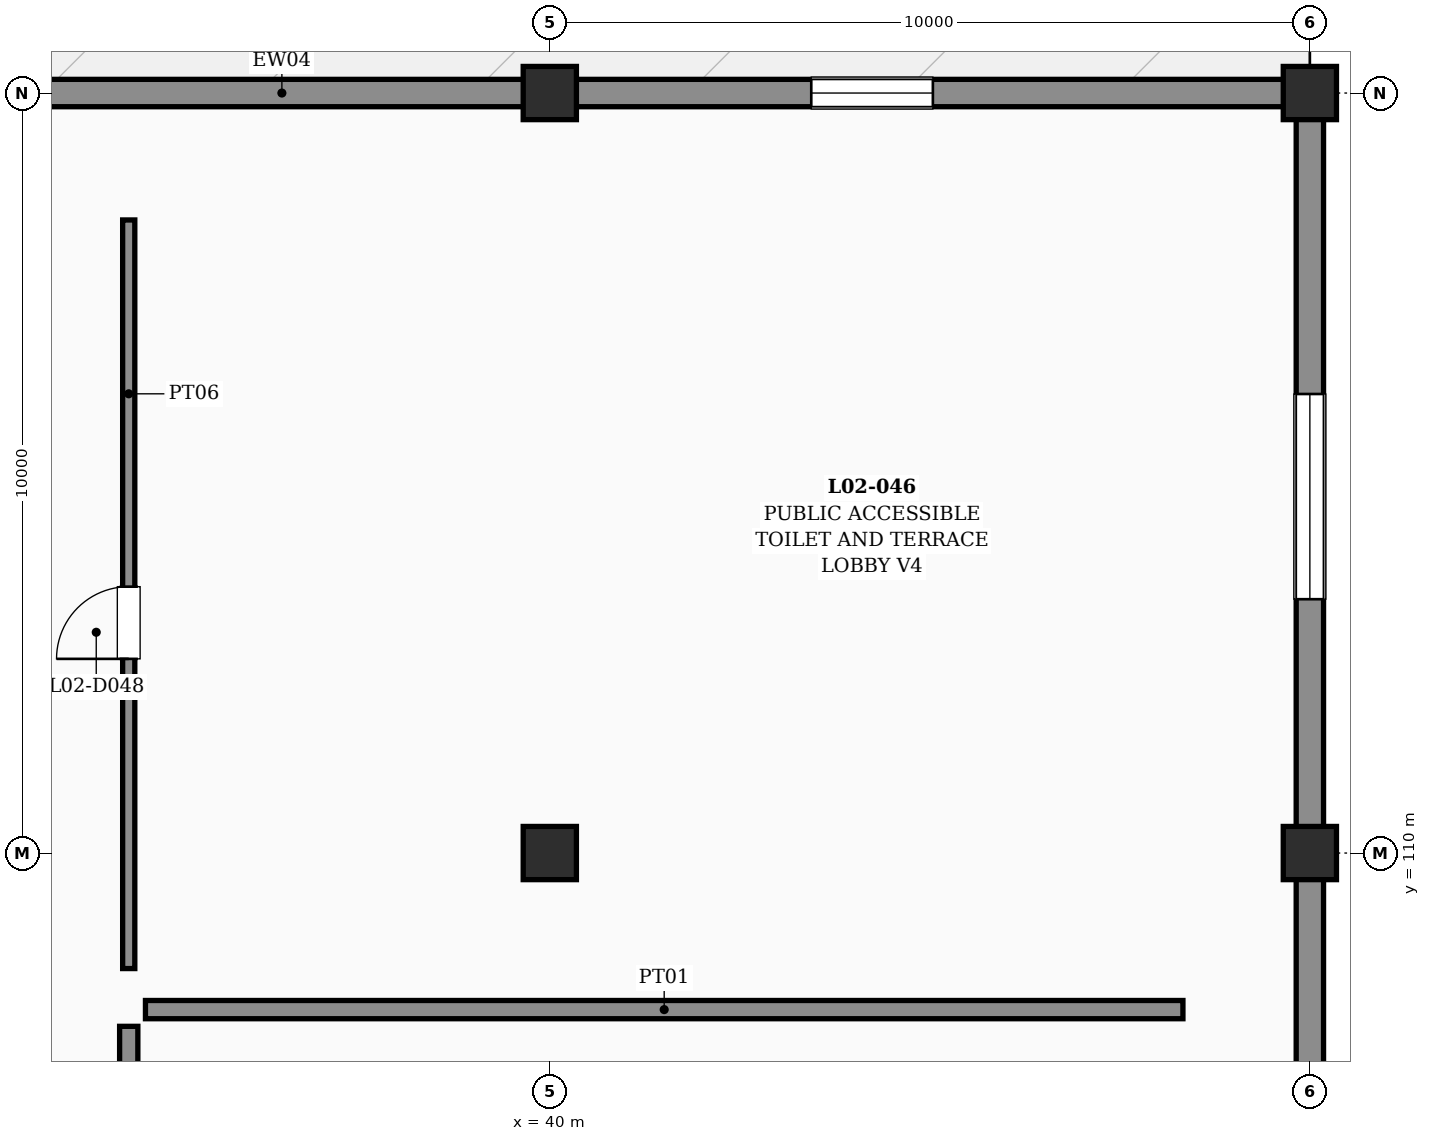
"""IFC4 building model, lengths in metres.
Left out: names, types, materials, properties, quantities, classifications, styles, units other than length and angle.
Written with IfcOpenShell. Run it as: python <this file> out.ifc"""

import sys

from ifc_helpers import new_model, si_unit, direction, frame, frame_2d, origin, origin_2d, place, context, subcontext, project, spatial, rectangle, extrude, element, fill, save


model = new_model("IFC4")
c1 = context("Model", 3, precision=1e-05, world=origin(), true_north=direction((0.0, 1.0)))
c2 = subcontext(c1, "Body", "Model", "MODEL_VIEW")
j1 = project(units=[si_unit("LENGTHUNIT", "METRE"), si_unit("PLANEANGLEUNIT", "RADIAN")], contexts=[c1])
p1 = place(None, origin())
s1 = spatial("IfcSite", under=j1, at=p1, CompositionType="ELEMENT")
p2 = place(p1, origin())
s2 = spatial("IfcBuilding", under=s1, at=p2, CompositionType="ELEMENT")
p3 = place(p2, frame((0.0, 0.0, 10.8)))
s3 = spatial("IfcBuildingStorey", under=s2, at=p3, CompositionType="ELEMENT", Elevation=10.8)
for number, where, z_axis, x_axis in (
    (1, (40.0, 110.0, 0.0), (0.0, 0.0, 1.0), (1.0, 0.0, 0.0)),
    (2, (40.0, 120.0, 0.0), (0.0, 0.0, 1.0), (1.0, 0.0, 0.0)),
    (3, (50.0, 110.0, 0.0), (0.0, 0.0, 1.0), (1.0, 0.0, 0.0)),
    (4, (50.0, 120.0, 0.0), (0.0, 0.0, 1.0), (1.0, 0.0, 0.0)),
):
    element("IfcColumn", number, at=place(p3, frame(where, z_axis=z_axis, x_axis=x_axis)), inside=s3, PredefinedType="COLUMN", context=c2, shape_type="SweptSolid", body=[
        extrude(rectangle(XDim=0.7, YDim=0.7, at=origin_2d()), origin(), (0.0, 0.0, 1.0), 4.2),
    ])
p4 = place(p3, frame((50.0, 100.24, 0.0), z_axis=(0.0, 0.0, 1.0), x_axis=(0.0, 1.0, 0.0)))
e5 = element("IfcWall", 5, at=p4, inside=s3, PredefinedType="SOLIDWALL", context=c2, shape_type="SweptSolid", body=[
    extrude(rectangle(XDim=9.52, YDim=0.36, at=frame_2d((4.76, 0.0))), origin(), (0.0, 0.0, 1.0), 3.08),
])
p5 = place(p4, frame((3.1, 0.0, 1.3)))
e6 = element("IfcOpeningElement", 6, at=p5, cuts=e5, PredefinedType="OPENING", context=c2, shape_type="SweptSolid", body=[
    extrude(rectangle(XDim=2.7, YDim=1.4, at=frame_2d((1.35, 0.7))), frame((0.0, 0.19, 0.0), z_axis=(0.0, -1.0, 0.0), x_axis=(1.0, 0.0, 0.0)), (0.0, 0.0, 1.0), 0.38),
])
p6 = place(p3, frame((50.0, 110.24, 0.0), z_axis=(0.0, 0.0, 1.0), x_axis=(0.0, 1.0, 0.0)))
e7 = element("IfcWall", 7, at=p6, inside=s3, PredefinedType="SOLIDWALL", context=c2, shape_type="SweptSolid", body=[
    extrude(rectangle(XDim=9.52, YDim=0.36, at=frame_2d((4.76, 0.0))), origin(), (0.0, 0.0, 1.0), 3.08),
])
p7 = place(p6, frame((3.1, 0.0, 1.3)))
e8 = element("IfcOpeningElement", 8, at=p7, cuts=e7, PredefinedType="OPENING", context=c2, shape_type="SweptSolid", body=[
    extrude(rectangle(XDim=2.7, YDim=1.4, at=frame_2d((1.35, 0.7))), frame((0.0, 0.19, 0.0), z_axis=(0.0, -1.0, 0.0), x_axis=(1.0, 0.0, 0.0)), (0.0, 0.0, 1.0), 0.38),
])
p8 = place(p3, frame((30.24, 120.0, 0.0), z_axis=(0.0, 0.0, 1.0), x_axis=(1.0, 0.0, 0.0)))
e9 = element("IfcWall", 9, at=p8, inside=s3, PredefinedType="SOLIDWALL", context=c2, shape_type="SweptSolid", body=[
    extrude(rectangle(XDim=9.52, YDim=0.36, at=frame_2d((4.76, 0.0))), origin(), (0.0, 0.0, 1.0), 3.23),
])
p9 = place(p8, frame((1.1, 0.0, 0.0)))
e10 = element("IfcOpeningElement", 10, at=p9, cuts=e9, PredefinedType="OPENING", context=c2, shape_type="SweptSolid", body=[
    extrude(rectangle(XDim=1.6, YDim=2.3, at=frame_2d((0.8, 1.15))), frame((0.0, 0.19, 0.0), z_axis=(0.0, -1.0, 0.0), x_axis=(1.0, 0.0, 0.0)), (0.0, 0.0, 1.0), 0.38),
])
p10 = place(p3, frame((40.24, 120.0, 0.0), z_axis=(0.0, 0.0, 1.0), x_axis=(1.0, 0.0, 0.0)))
e11 = element("IfcWall", 11, at=p10, inside=s3, PredefinedType="SOLIDWALL", context=c2, shape_type="SweptSolid", body=[
    extrude(rectangle(XDim=9.52, YDim=0.36, at=frame_2d((4.76, 0.0))), origin(), (0.0, 0.0, 1.0), 3.23),
])
p11 = place(p10, frame((3.2, 0.0, 1.1)))
e12 = element("IfcOpeningElement", 12, at=p11, cuts=e11, PredefinedType="OPENING", context=c2, shape_type="SweptSolid", body=[
    extrude(rectangle(XDim=1.6, YDim=1.5, at=frame_2d((0.8, 0.75))), frame((0.0, 0.19, 0.0), z_axis=(0.0, -1.0, 0.0), x_axis=(1.0, 0.0, 0.0)), (0.0, 0.0, 1.0), 0.38),
])
p12 = place(p3, frame((34.46, 79.846, 0.0), z_axis=(0.0, 0.0, 1.0), x_axis=(0.0, 1.0, 0.0)))
e13 = element("IfcWall", 13, at=p12, inside=s3, PredefinedType="PARTITIONING", context=c2, shape_type="SweptSolid", body=[
    extrude(rectangle(XDim=27.874, YDim=0.24, at=frame_2d((13.937, 0.0))), origin(), (0.0, 0.0, 1.0), 3.23),
])
p13 = place(p12, frame((13.087, 0.0, 0.0)))
e14 = element("IfcOpeningElement", 14, at=p13, cuts=e13, PredefinedType="OPENING", context=c2, shape_type="SweptSolid", body=[
    extrude(rectangle(XDim=1.4, YDim=2.25, at=frame_2d((0.7, 1.125))), frame((0.0, 0.13, 0.0), z_axis=(0.0, -1.0, 0.0), x_axis=(1.0, 0.0, 0.0)), (0.0, 0.0, 1.0), 0.26),
])
p14 = place(p3, frame((34.68, 107.94, 0.0), z_axis=(0.0, 0.0, 1.0), x_axis=(1.0, 0.0, 0.0)))
e15 = element("IfcWall", 15, at=p14, inside=s3, PredefinedType="PARTITIONING", context=c2, shape_type="SweptSolid", body=[
    extrude(rectangle(XDim=13.65, YDim=0.24, at=frame_2d((6.825, 0.0))), origin(), (0.0, 0.0, 1.0), 3.23),
])
p15 = place(p3, frame((34.46, 108.48, 0.0), z_axis=(0.0, 0.0, 1.0), x_axis=(0.0, 1.0, 0.0)))
e16 = element("IfcWall", 16, at=p15, inside=s3, PredefinedType="PARTITIONING", context=c2, shape_type="SweptSolid", body=[
    extrude(rectangle(XDim=9.85, YDim=0.16, at=frame_2d((4.925, 0.0))), origin(), (0.0, 0.0, 1.0), 3.92),
])
p16 = place(p15, frame((4.075, 0.0, 0.0)))
e17 = element("IfcOpeningElement", 17, at=p16, cuts=e16, PredefinedType="OPENING", context=c2, shape_type="SweptSolid", body=[
    extrude(rectangle(XDim=0.95, YDim=2.15, at=frame_2d((0.475, 1.075))), frame((0.0, 0.09, 0.0), z_axis=(0.0, -1.0, 0.0), x_axis=(1.0, 0.0, 0.0)), (0.0, 0.0, 1.0), 0.18),
])
p17 = place(p7, origin())
e18 = element("IfcWindow", 18, at=p17, inside=s3, PartitioningType="SINGLE_PANEL", PredefinedType="WINDOW", context=c2, shape_type="SweptSolid", body=[
    extrude(rectangle(XDim=2.7, YDim=1.4, at=frame_2d((1.35, 0.7))), frame((0.0, 0.03, 0.0), z_axis=(0.0, -1.0, 0.0), x_axis=(1.0, 0.0, 0.0)), (0.0, 0.0, 1.0), 0.06),
])
fill(e8, e18)
p18 = place(p11, origin())
e19 = element("IfcWindow", 19, at=p18, inside=s3, PartitioningType="SINGLE_PANEL", PredefinedType="WINDOW", context=c2, shape_type="SweptSolid", body=[
    extrude(rectangle(XDim=1.6, YDim=1.5, at=frame_2d((0.8, 0.75))), frame((0.0, 0.03, 0.0), z_axis=(0.0, -1.0, 0.0), x_axis=(1.0, 0.0, 0.0)), (0.0, 0.0, 1.0), 0.06),
])
fill(e12, e19)
p19 = place(p16, origin())
e20 = element("IfcDoor", 20, at=p19, inside=s3, OperationType="SINGLE_SWING_LEFT", PredefinedType="DOOR", context=c2, shape_type="SweptSolid", body=[
    extrude(rectangle(XDim=0.95, YDim=2.15, at=frame_2d((0.475, 1.075))), frame((0.0, 0.025, 0.0), z_axis=(0.0, -1.0, 0.0), x_axis=(1.0, 0.0, 0.0)), (0.0, 0.0, 1.0), 0.05),
])
fill(e17, e20)
save(model, sys.argv[1])
